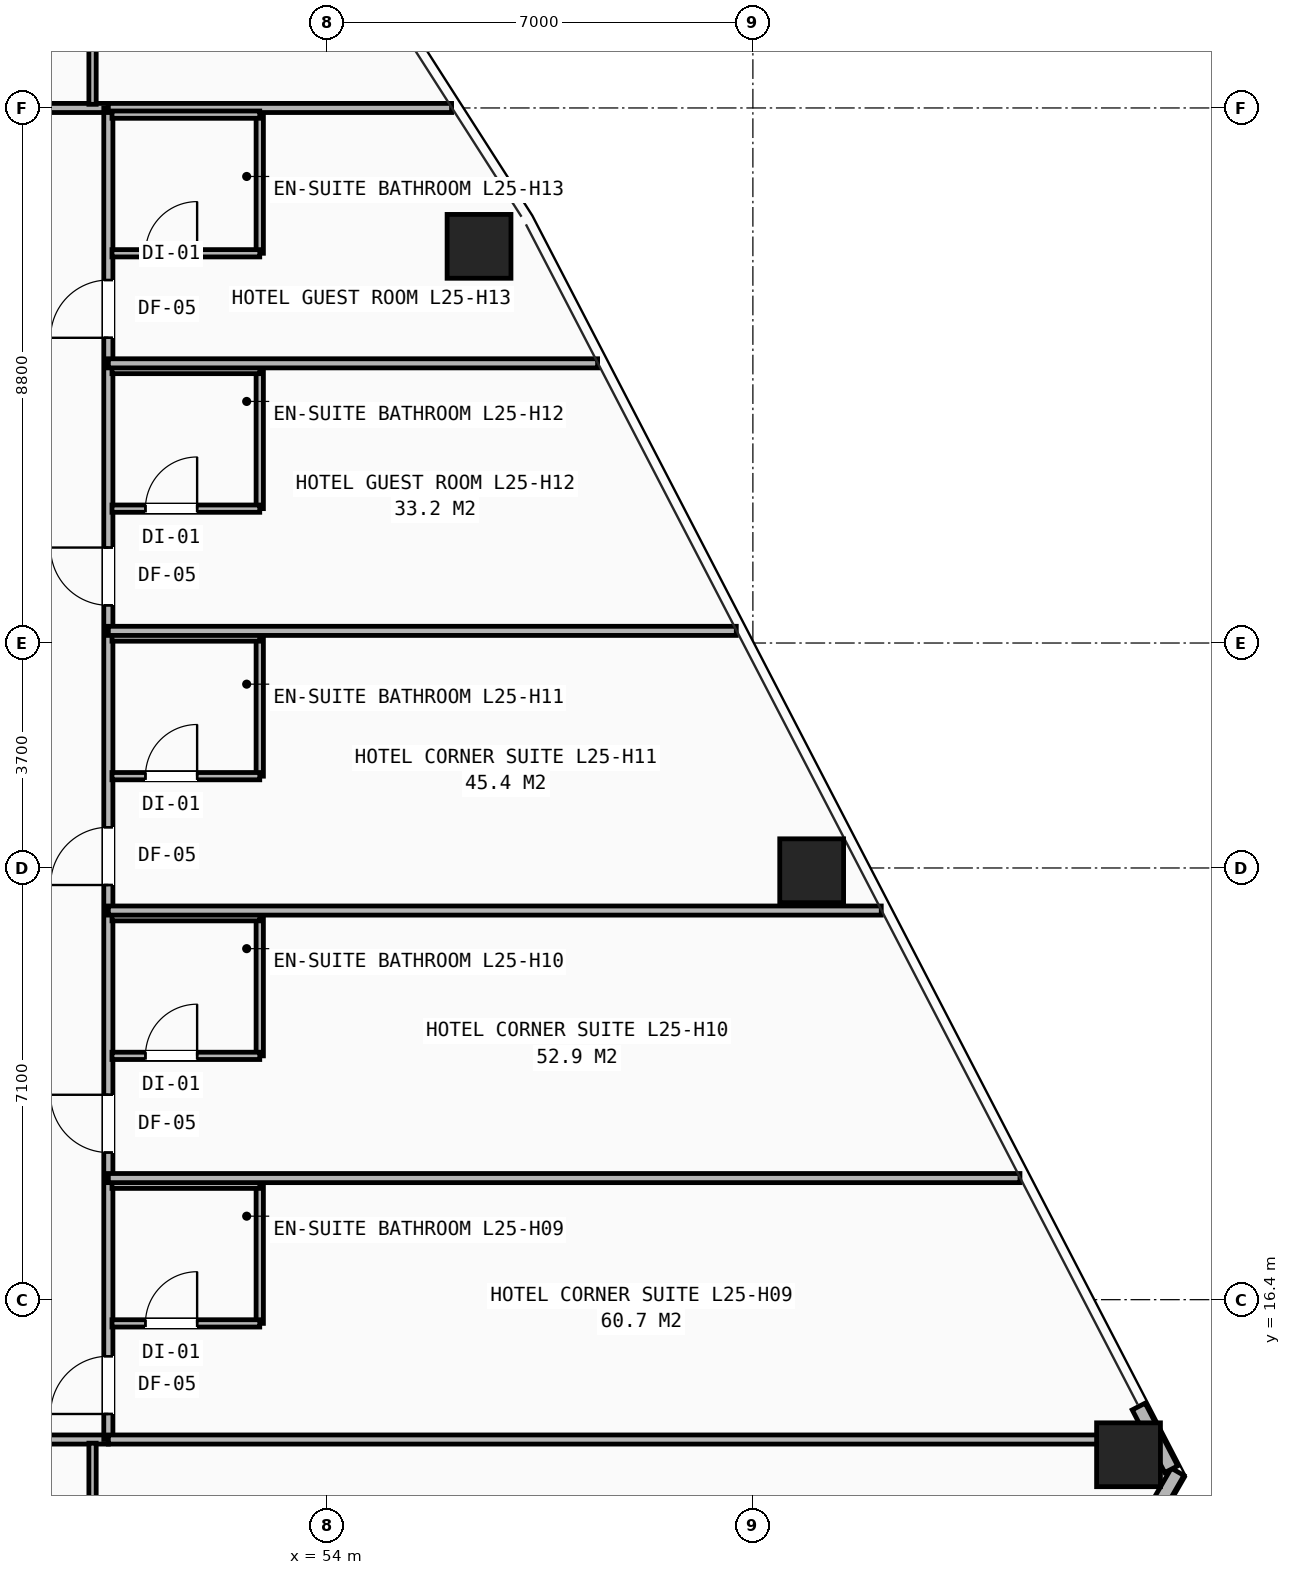
"""IFC4 building model, lengths in metres.
Left out: names, types, materials, properties, quantities, classifications, styles, units other than length and angle.
Written with IfcOpenShell. Run it as: python <this file> out.ifc"""

import sys

from ifc_helpers import new_model, si_unit, direction, frame, frame_2d, origin, origin_2d, place, context, subcontext, project, spatial, rectangle, hollow_rectangle, extrude, element, fill, save


model = new_model("IFC4")
c1 = context("Model", 3, precision=1e-05, world=origin(), true_north=direction((0.0, 1.0)))
c2 = subcontext(c1, "Body", "Model", "MODEL_VIEW")
j1 = project(units=[si_unit("LENGTHUNIT", "METRE"), si_unit("PLANEANGLEUNIT", "RADIAN")], contexts=[c1])
p1 = place(None, origin())
s1 = spatial("IfcSite", under=j1, at=p1, CompositionType="ELEMENT")
p2 = place(p1, origin())
s2 = spatial("IfcBuilding", under=s1, at=p2, CompositionType="ELEMENT")
p3 = place(p2, frame((0.0, 0.0, 89.4)))
s3 = spatial("IfcBuildingStorey", under=s2, at=p3, CompositionType="ELEMENT", Elevation=89.4)
for number, where, z_axis, x_axis in (
    (1, (67.177, 13.849, 0.0), (0.0, 0.0, 1.0), (1.0, 0.0, 0.0)),
    (2, (61.967, 23.455, 0.0), (0.0, 0.0, 1.0), (1.0, 0.0, 0.0)),
    (3, (56.496, 33.724, 0.0), (0.0, 0.0, 1.0), (1.0, 0.0, 0.0)),
):
    element("IfcColumn", number, at=place(p3, frame(where, z_axis=z_axis, x_axis=x_axis)), inside=s3, PredefinedType="COLUMN", context=c2, shape_type="SweptSolid", body=[
        extrude(hollow_rectangle(XDim=1.05, YDim=1.05, WallThickness=0.07, at=origin_2d()), origin(), (0.0, 0.0, 1.0), 3.2),
    ])
p4 = place(p3, frame((67.985, 13.569, 0.0), z_axis=(0.0, 0.0, 1.0), x_axis=(-0.499996243911, -0.866027572353, 0.0)))
e4 = element("IfcWall", 4, at=p4, inside=s3, PredefinedType="SHEAR", context=c2, shape_type="SweptSolid", body=[
    extrude(rectangle(XDim=9.571, YDim=0.24, at=frame_2d((4.786, 0.0))), origin(), (0.0, 0.0, 1.0), 2.253),
])
p5 = place(p3, frame((67.88, 13.611, 0.0), z_axis=(0.0, 0.0, 1.0), x_axis=(-0.460022833548, 0.887907085575, 0.0)))
e5 = element("IfcWall", 5, at=p5, inside=s3, PredefinedType="SHEAR", context=c2, shape_type="SweptSolid", body=[
    extrude(rectangle(XDim=1.162, YDim=0.24, at=frame_2d((0.581, 0.0))), origin(), (0.0, 0.0, 1.0), 2.253),
])
p6 = place(p3, frame((29.6, 14.1, 0.0), z_axis=(0.0, 0.0, 1.0), x_axis=(1.0, 0.0, 0.0)))
e6 = element("IfcWall", 6, at=p6, inside=s3, PredefinedType="PARTITIONING", context=c2, shape_type="SweptSolid", body=[
    extrude(rectangle(XDim=20.8, YDim=0.15, at=frame_2d((10.4, 0.0))), origin(), (0.0, 0.0, 1.0), 2.181),
])
p7 = place(p6, frame((0.57, 0.0, 0.0)))
e7 = element("IfcOpeningElement", 7, at=p7, cuts=e6, PredefinedType="OPENING", context=c2, shape_type="SweptSolid", body=[
    extrude(rectangle(XDim=0.95, YDim=2.1, at=frame_2d((0.475, 1.05))), frame((0.0, 0.085, 0.0), z_axis=(0.0, -1.0, 0.0), x_axis=(1.0, 0.0, 0.0)), (0.0, 0.0, 1.0), 0.17),
])
p8 = place(p6, frame((5.02, 0.0, 0.0)))
e8 = element("IfcOpeningElement", 8, at=p8, cuts=e6, PredefinedType="OPENING", context=c2, shape_type="SweptSolid", body=[
    extrude(rectangle(XDim=0.95, YDim=2.1, at=frame_2d((0.475, 1.05))), frame((0.0, 0.085, 0.0), z_axis=(0.0, -1.0, 0.0), x_axis=(1.0, 0.0, 0.0)), (0.0, 0.0, 1.0), 0.17),
])
p9 = place(p6, frame((10.62, 0.0, 0.0)))
e9 = element("IfcOpeningElement", 9, at=p9, cuts=e6, PredefinedType="OPENING", context=c2, shape_type="SweptSolid", body=[
    extrude(rectangle(XDim=0.95, YDim=2.1, at=frame_2d((0.475, 1.05))), frame((0.0, 0.085, 0.0), z_axis=(0.0, -1.0, 0.0), x_axis=(1.0, 0.0, 0.0)), (0.0, 0.0, 1.0), 0.17),
])
p10 = place(p6, frame((16.42, 0.0, 0.0)))
e10 = element("IfcOpeningElement", 10, at=p10, cuts=e6, PredefinedType="OPENING", context=c2, shape_type="SweptSolid", body=[
    extrude(rectangle(XDim=0.95, YDim=2.1, at=frame_2d((0.475, 1.05))), frame((0.0, 0.085, 0.0), z_axis=(0.0, -1.0, 0.0), x_axis=(1.0, 0.0, 0.0)), (0.0, 0.0, 1.0), 0.17),
])
p11 = place(p3, frame((40.75, 36.0, 0.0), z_axis=(0.0, 0.0, 1.0), x_axis=(1.0, 0.0, 0.0)))
e11 = element("IfcWall", 11, at=p11, inside=s3, PredefinedType="PARTITIONING", context=c2, shape_type="SweptSolid", body=[
    extrude(rectangle(XDim=9.65, YDim=0.15, at=frame_2d((4.825, 0.0))), origin(), (0.0, 0.0, 1.0), 2.503),
])
p12 = place(p11, frame((2.87, 0.0, 0.0)))
e12 = element("IfcOpeningElement", 12, at=p12, cuts=e11, PredefinedType="OPENING", context=c2, shape_type="SweptSolid", body=[
    extrude(rectangle(XDim=0.95, YDim=2.1, at=frame_2d((0.475, 1.05))), frame((0.0, 0.085, 0.0), z_axis=(0.0, -1.0, 0.0), x_axis=(1.0, 0.0, 0.0)), (0.0, 0.0, 1.0), 0.17),
])
p13 = place(p3, frame((50.4, 14.1, 0.0), z_axis=(0.0, 0.0, 1.0), x_axis=(0.0, 1.0, 0.0)))
e13 = element("IfcWall", 13, at=p13, inside=s3, PredefinedType="PARTITIONING", context=c2, shape_type="SweptSolid", body=[
    extrude(rectangle(XDim=21.9, YDim=0.15, at=frame_2d((10.95, 0.0))), origin(), (0.0, 0.0, 1.0), 2.181),
])
p14 = place(p13, frame((0.42, 0.0, 0.0)))
e14 = element("IfcOpeningElement", 14, at=p14, cuts=e13, PredefinedType="OPENING", context=c2, shape_type="SweptSolid", body=[
    extrude(rectangle(XDim=0.95, YDim=2.1, at=frame_2d((0.475, 1.05))), frame((0.0, 0.085, 0.0), z_axis=(0.0, -1.0, 0.0), x_axis=(1.0, 0.0, 0.0)), (0.0, 0.0, 1.0), 0.17),
])
p15 = place(p13, frame((4.72, 0.0, 0.0)))
e15 = element("IfcOpeningElement", 15, at=p15, cuts=e13, PredefinedType="OPENING", context=c2, shape_type="SweptSolid", body=[
    extrude(rectangle(XDim=0.95, YDim=2.1, at=frame_2d((0.475, 1.05))), frame((0.0, 0.085, 0.0), z_axis=(0.0, -1.0, 0.0), x_axis=(1.0, 0.0, 0.0)), (0.0, 0.0, 1.0), 0.17),
])
p16 = place(p13, frame((9.12, 0.0, 0.0)))
e16 = element("IfcOpeningElement", 16, at=p16, cuts=e13, PredefinedType="OPENING", context=c2, shape_type="SweptSolid", body=[
    extrude(rectangle(XDim=0.95, YDim=2.1, at=frame_2d((0.475, 1.05))), frame((0.0, 0.085, 0.0), z_axis=(0.0, -1.0, 0.0), x_axis=(1.0, 0.0, 0.0)), (0.0, 0.0, 1.0), 0.17),
])
p17 = place(p13, frame((13.72, 0.0, 0.0)))
e17 = element("IfcOpeningElement", 17, at=p17, cuts=e13, PredefinedType="OPENING", context=c2, shape_type="SweptSolid", body=[
    extrude(rectangle(XDim=0.95, YDim=2.1, at=frame_2d((0.475, 1.05))), frame((0.0, 0.085, 0.0), z_axis=(0.0, -1.0, 0.0), x_axis=(1.0, 0.0, 0.0)), (0.0, 0.0, 1.0), 0.17),
])
p18 = place(p13, frame((18.12, 0.0, 0.0)))
e18 = element("IfcOpeningElement", 18, at=p18, cuts=e13, PredefinedType="OPENING", context=c2, shape_type="SweptSolid", body=[
    extrude(rectangle(XDim=0.95, YDim=2.1, at=frame_2d((0.475, 1.05))), frame((0.0, 0.085, 0.0), z_axis=(0.0, -1.0, 0.0), x_axis=(1.0, 0.0, 0.0)), (0.0, 0.0, 1.0), 0.17),
])
p19 = place(p3, frame((50.14, 11.61, 0.0), z_axis=(0.0, 0.0, 1.0), x_axis=(0.0, 1.0, 0.0)))
e19 = element("IfcWall", 19, at=p19, inside=s3, PredefinedType="PARTITIONING", context=c2, shape_type="SweptSolid", body=[
    extrude(rectangle(XDim=2.43, YDim=0.12, at=frame_2d((1.215, 0.0))), origin(), (0.0, 0.0, 1.0), 2.97),
])
p20 = place(p3, frame((50.4, 14.1, 0.0), z_axis=(0.0, 0.0, 1.0), x_axis=(1.0, 0.0, 0.0)))
e20 = element("IfcWall", 20, at=p20, inside=s3, PredefinedType="PARTITIONING", context=c2, shape_type="SweptSolid", body=[
    extrude(rectangle(XDim=17.221, YDim=0.15, at=frame_2d((8.61, 0.0))), origin(), (0.0, 0.0, 1.0), 2.181),
])
p21 = place(p3, frame((50.4, 36.0, 0.0), z_axis=(0.0, 0.0, 1.0), x_axis=(1.0, 0.0, 0.0)))
e21 = element("IfcWall", 21, at=p21, inside=s3, PredefinedType="PARTITIONING", context=c2, shape_type="SweptSolid", body=[
    extrude(rectangle(XDim=5.645, YDim=0.15, at=frame_2d((2.823, 0.0))), origin(), (0.0, 0.0, 1.0), 2.258),
])
p22 = place(p3, frame((52.89, 16.01, 0.0), z_axis=(0.0, 0.0, 1.0), x_axis=(0.0, 1.0, 0.0)))
e22 = element("IfcWall", 22, at=p22, inside=s3, PredefinedType="PARTITIONING", context=c2, shape_type="SweptSolid", body=[
    extrude(rectangle(XDim=2.28, YDim=0.12, at=frame_2d((1.14, 0.0))), origin(), (0.0, 0.0, 1.0), 2.97),
])
p23 = place(p3, frame((50.46, 16.01, 0.0), z_axis=(0.0, 0.0, 1.0), x_axis=(1.0, 0.0, 0.0)))
e23 = element("IfcWall", 23, at=p23, inside=s3, PredefinedType="PARTITIONING", context=c2, shape_type="SweptSolid", body=[
    extrude(rectangle(XDim=2.43, YDim=0.12, at=frame_2d((1.215, 0.0))), origin(), (0.0, 0.0, 1.0), 2.97),
])
p24 = place(p23, frame((0.55, 0.0, 0.0)))
e24 = element("IfcOpeningElement", 24, at=p24, cuts=e23, PredefinedType="OPENING", context=c2, shape_type="SweptSolid", body=[
    extrude(rectangle(XDim=0.85, YDim=2.05, at=frame_2d((0.425, 1.025))), frame((0.0, 0.07, 0.0), z_axis=(0.0, -1.0, 0.0), x_axis=(1.0, 0.0, 0.0)), (0.0, 0.0, 1.0), 0.14),
])
p25 = place(p3, frame((50.46, 18.29, 0.0), z_axis=(0.0, 0.0, 1.0), x_axis=(1.0, 0.0, 0.0)))
e25 = element("IfcWall", 25, at=p25, inside=s3, PredefinedType="PARTITIONING", context=c2, shape_type="SweptSolid", body=[
    extrude(rectangle(XDim=2.43, YDim=0.12, at=frame_2d((1.215, 0.0))), origin(), (0.0, 0.0, 1.0), 2.97),
])
p26 = place(p3, frame((50.4, 18.4, 0.0), z_axis=(0.0, 0.0, 1.0), x_axis=(1.0, 0.0, 0.0)))
e26 = element("IfcWall", 26, at=p26, inside=s3, PredefinedType="PARTITIONING", context=c2, shape_type="SweptSolid", body=[
    extrude(rectangle(XDim=14.992, YDim=0.15, at=frame_2d((7.496, 0.0))), origin(), (0.0, 0.0, 1.0), 2.258),
])
p27 = place(p3, frame((52.89, 20.41, 0.0), z_axis=(0.0, 0.0, 1.0), x_axis=(0.0, 1.0, 0.0)))
e27 = element("IfcWall", 27, at=p27, inside=s3, PredefinedType="PARTITIONING", context=c2, shape_type="SweptSolid", body=[
    extrude(rectangle(XDim=2.28, YDim=0.12, at=frame_2d((1.14, 0.0))), origin(), (0.0, 0.0, 1.0), 2.97),
])
p28 = place(p3, frame((50.46, 20.41, 0.0), z_axis=(0.0, 0.0, 1.0), x_axis=(1.0, 0.0, 0.0)))
e28 = element("IfcWall", 28, at=p28, inside=s3, PredefinedType="PARTITIONING", context=c2, shape_type="SweptSolid", body=[
    extrude(rectangle(XDim=2.43, YDim=0.12, at=frame_2d((1.215, 0.0))), origin(), (0.0, 0.0, 1.0), 2.97),
])
p29 = place(p28, frame((0.55, 0.0, 0.0)))
e29 = element("IfcOpeningElement", 29, at=p29, cuts=e28, PredefinedType="OPENING", context=c2, shape_type="SweptSolid", body=[
    extrude(rectangle(XDim=0.85, YDim=2.05, at=frame_2d((0.425, 1.025))), frame((0.0, 0.07, 0.0), z_axis=(0.0, -1.0, 0.0), x_axis=(1.0, 0.0, 0.0)), (0.0, 0.0, 1.0), 0.14),
])
p30 = place(p3, frame((50.46, 22.69, 0.0), z_axis=(0.0, 0.0, 1.0), x_axis=(1.0, 0.0, 0.0)))
e30 = element("IfcWall", 30, at=p30, inside=s3, PredefinedType="PARTITIONING", context=c2, shape_type="SweptSolid", body=[
    extrude(rectangle(XDim=2.43, YDim=0.12, at=frame_2d((1.215, 0.0))), origin(), (0.0, 0.0, 1.0), 2.97),
])
p31 = place(p3, frame((50.4, 22.8, 0.0), z_axis=(0.0, 0.0, 1.0), x_axis=(1.0, 0.0, 0.0)))
e31 = element("IfcWall", 31, at=p31, inside=s3, PredefinedType="PARTITIONING", context=c2, shape_type="SweptSolid", body=[
    extrude(rectangle(XDim=12.711, YDim=0.15, at=frame_2d((6.356, 0.0))), origin(), (0.0, 0.0, 1.0), 2.258),
])
p32 = place(p3, frame((52.89, 25.01, 0.0), z_axis=(0.0, 0.0, 1.0), x_axis=(0.0, 1.0, 0.0)))
e32 = element("IfcWall", 32, at=p32, inside=s3, PredefinedType="PARTITIONING", context=c2, shape_type="SweptSolid", body=[
    extrude(rectangle(XDim=2.28, YDim=0.12, at=frame_2d((1.14, 0.0))), origin(), (0.0, 0.0, 1.0), 2.97),
])
p33 = place(p3, frame((50.46, 25.01, 0.0), z_axis=(0.0, 0.0, 1.0), x_axis=(1.0, 0.0, 0.0)))
e33 = element("IfcWall", 33, at=p33, inside=s3, PredefinedType="PARTITIONING", context=c2, shape_type="SweptSolid", body=[
    extrude(rectangle(XDim=2.43, YDim=0.12, at=frame_2d((1.215, 0.0))), origin(), (0.0, 0.0, 1.0), 2.97),
])
p34 = place(p33, frame((0.55, 0.0, 0.0)))
e34 = element("IfcOpeningElement", 34, at=p34, cuts=e33, PredefinedType="OPENING", context=c2, shape_type="SweptSolid", body=[
    extrude(rectangle(XDim=0.85, YDim=2.05, at=frame_2d((0.425, 1.025))), frame((0.0, 0.07, 0.0), z_axis=(0.0, -1.0, 0.0), x_axis=(1.0, 0.0, 0.0)), (0.0, 0.0, 1.0), 0.14),
])
p35 = place(p3, frame((50.46, 27.29, 0.0), z_axis=(0.0, 0.0, 1.0), x_axis=(1.0, 0.0, 0.0)))
e35 = element("IfcWall", 35, at=p35, inside=s3, PredefinedType="PARTITIONING", context=c2, shape_type="SweptSolid", body=[
    extrude(rectangle(XDim=2.43, YDim=0.12, at=frame_2d((1.215, 0.0))), origin(), (0.0, 0.0, 1.0), 2.97),
])
p36 = place(p3, frame((50.4, 27.4, 0.0), z_axis=(0.0, 0.0, 1.0), x_axis=(1.0, 0.0, 0.0)))
e36 = element("IfcWall", 36, at=p36, inside=s3, PredefinedType="PARTITIONING", context=c2, shape_type="SweptSolid", body=[
    extrude(rectangle(XDim=10.327, YDim=0.15, at=frame_2d((5.164, 0.0))), origin(), (0.0, 0.0, 1.0), 2.258),
])
p37 = place(p3, frame((52.89, 29.41, 0.0), z_axis=(0.0, 0.0, 1.0), x_axis=(0.0, 1.0, 0.0)))
e37 = element("IfcWall", 37, at=p37, inside=s3, PredefinedType="PARTITIONING", context=c2, shape_type="SweptSolid", body=[
    extrude(rectangle(XDim=2.28, YDim=0.12, at=frame_2d((1.14, 0.0))), origin(), (0.0, 0.0, 1.0), 2.97),
])
p38 = place(p3, frame((50.46, 29.41, 0.0), z_axis=(0.0, 0.0, 1.0), x_axis=(1.0, 0.0, 0.0)))
e38 = element("IfcWall", 38, at=p38, inside=s3, PredefinedType="PARTITIONING", context=c2, shape_type="SweptSolid", body=[
    extrude(rectangle(XDim=2.43, YDim=0.12, at=frame_2d((1.215, 0.0))), origin(), (0.0, 0.0, 1.0), 2.97),
])
p39 = place(p38, frame((0.55, 0.0, 0.0)))
e39 = element("IfcOpeningElement", 39, at=p39, cuts=e38, PredefinedType="OPENING", context=c2, shape_type="SweptSolid", body=[
    extrude(rectangle(XDim=0.85, YDim=2.05, at=frame_2d((0.425, 1.025))), frame((0.0, 0.07, 0.0), z_axis=(0.0, -1.0, 0.0), x_axis=(1.0, 0.0, 0.0)), (0.0, 0.0, 1.0), 0.14),
])
p40 = place(p3, frame((50.46, 31.69, 0.0), z_axis=(0.0, 0.0, 1.0), x_axis=(1.0, 0.0, 0.0)))
e40 = element("IfcWall", 40, at=p40, inside=s3, PredefinedType="PARTITIONING", context=c2, shape_type="SweptSolid", body=[
    extrude(rectangle(XDim=2.43, YDim=0.12, at=frame_2d((1.215, 0.0))), origin(), (0.0, 0.0, 1.0), 2.181),
])
p41 = place(p3, frame((50.4, 31.8, 0.0), z_axis=(0.0, 0.0, 1.0), x_axis=(1.0, 0.0, 0.0)))
e41 = element("IfcWall", 41, at=p41, inside=s3, PredefinedType="PARTITIONING", context=c2, shape_type="SweptSolid", body=[
    extrude(rectangle(XDim=8.046, YDim=0.15, at=frame_2d((4.023, 0.0))), origin(), (0.0, 0.0, 1.0), 2.181),
])
p42 = place(p3, frame((52.89, 33.61, 0.0), z_axis=(0.0, 0.0, 1.0), x_axis=(0.0, 1.0, 0.0)))
e42 = element("IfcWall", 42, at=p42, inside=s3, PredefinedType="PARTITIONING", context=c2, shape_type="SweptSolid", body=[
    extrude(rectangle(XDim=2.28, YDim=0.12, at=frame_2d((1.14, 0.0))), origin(), (0.0, 0.0, 1.0), 2.97),
])
p43 = place(p3, frame((50.46, 33.61, 0.0), z_axis=(0.0, 0.0, 1.0), x_axis=(1.0, 0.0, 0.0)))
e43 = element("IfcWall", 43, at=p43, inside=s3, PredefinedType="PARTITIONING", context=c2, shape_type="SweptSolid", body=[
    extrude(rectangle(XDim=2.43, YDim=0.12, at=frame_2d((1.215, 0.0))), origin(), (0.0, 0.0, 1.0), 2.503),
])
p44 = place(p43, frame((0.55, 0.0, 0.0)))
e44 = element("IfcOpeningElement", 44, at=p44, cuts=e43, PredefinedType="OPENING", context=c2, shape_type="SweptSolid", body=[
    extrude(rectangle(XDim=0.85, YDim=2.05, at=frame_2d((0.425, 1.025))), frame((0.0, 0.07, 0.0), z_axis=(0.0, -1.0, 0.0), x_axis=(1.0, 0.0, 0.0)), (0.0, 0.0, 1.0), 0.14),
])
for number, where, z_axis, x_axis in (
    (45, (50.46, 35.89, 0.0), (0.0, 0.0, 1.0), (1.0, 0.0, 0.0)),
    (46, (50.14, 36.06, 0.0), (0.0, 0.0, 1.0), (0.0, 1.0, 0.0)),
):
    element("IfcWall", number, at=place(p3, frame(where, z_axis=z_axis, x_axis=x_axis)), inside=s3, PredefinedType="PARTITIONING", context=c2, shape_type="SweptSolid", body=[
        extrude(rectangle(XDim=2.43, YDim=0.12, at=frame_2d((1.215, 0.0))), origin(), (0.0, 0.0, 1.0), 2.97),
    ])
p45 = place(p14, origin())
e47 = element("IfcDoor", 47, at=p45, inside=s3, OperationType="SINGLE_SWING_LEFT", PredefinedType="DOOR", context=c2, shape_type="SweptSolid", body=[
    extrude(rectangle(XDim=0.95, YDim=2.1, at=frame_2d((0.475, 1.05))), frame((0.0, 0.025, 0.0), z_axis=(0.0, -1.0, 0.0), x_axis=(1.0, 0.0, 0.0)), (0.0, 0.0, 1.0), 0.05),
])
fill(e14, e47)
p46 = place(p24, origin())
e48 = element("IfcDoor", 48, at=p46, inside=s3, OperationType="SINGLE_SWING_RIGHT", PredefinedType="DOOR", context=c2, shape_type="SweptSolid", body=[
    extrude(rectangle(XDim=0.85, YDim=2.05, at=frame_2d((0.425, 1.025))), frame((0.0, 0.025, 0.0), z_axis=(0.0, -1.0, 0.0), x_axis=(1.0, 0.0, 0.0)), (0.0, 0.0, 1.0), 0.05),
])
fill(e24, e48)
p47 = place(p15, origin())
e49 = element("IfcDoor", 49, at=p47, inside=s3, OperationType="SINGLE_SWING_RIGHT", PredefinedType="DOOR", context=c2, shape_type="SweptSolid", body=[
    extrude(rectangle(XDim=0.95, YDim=2.1, at=frame_2d((0.475, 1.05))), frame((0.0, 0.025, 0.0), z_axis=(0.0, -1.0, 0.0), x_axis=(1.0, 0.0, 0.0)), (0.0, 0.0, 1.0), 0.05),
])
fill(e15, e49)
p48 = place(p29, origin())
e50 = element("IfcDoor", 50, at=p48, inside=s3, OperationType="SINGLE_SWING_RIGHT", PredefinedType="DOOR", context=c2, shape_type="SweptSolid", body=[
    extrude(rectangle(XDim=0.85, YDim=2.05, at=frame_2d((0.425, 1.025))), frame((0.0, 0.025, 0.0), z_axis=(0.0, -1.0, 0.0), x_axis=(1.0, 0.0, 0.0)), (0.0, 0.0, 1.0), 0.05),
])
fill(e29, e50)
p49 = place(p16, origin())
e51 = element("IfcDoor", 51, at=p49, inside=s3, OperationType="SINGLE_SWING_LEFT", PredefinedType="DOOR", context=c2, shape_type="SweptSolid", body=[
    extrude(rectangle(XDim=0.95, YDim=2.1, at=frame_2d((0.475, 1.05))), frame((0.0, 0.025, 0.0), z_axis=(0.0, -1.0, 0.0), x_axis=(1.0, 0.0, 0.0)), (0.0, 0.0, 1.0), 0.05),
])
fill(e16, e51)
p50 = place(p34, origin())
e52 = element("IfcDoor", 52, at=p50, inside=s3, OperationType="SINGLE_SWING_RIGHT", PredefinedType="DOOR", context=c2, shape_type="SweptSolid", body=[
    extrude(rectangle(XDim=0.85, YDim=2.05, at=frame_2d((0.425, 1.025))), frame((0.0, 0.025, 0.0), z_axis=(0.0, -1.0, 0.0), x_axis=(1.0, 0.0, 0.0)), (0.0, 0.0, 1.0), 0.05),
])
fill(e34, e52)
p51 = place(p17, origin())
e53 = element("IfcDoor", 53, at=p51, inside=s3, OperationType="SINGLE_SWING_RIGHT", PredefinedType="DOOR", context=c2, shape_type="SweptSolid", body=[
    extrude(rectangle(XDim=0.95, YDim=2.1, at=frame_2d((0.475, 1.05))), frame((0.0, 0.025, 0.0), z_axis=(0.0, -1.0, 0.0), x_axis=(1.0, 0.0, 0.0)), (0.0, 0.0, 1.0), 0.05),
])
fill(e17, e53)
p52 = place(p39, origin())
e54 = element("IfcDoor", 54, at=p52, inside=s3, OperationType="SINGLE_SWING_RIGHT", PredefinedType="DOOR", context=c2, shape_type="SweptSolid", body=[
    extrude(rectangle(XDim=0.85, YDim=2.05, at=frame_2d((0.425, 1.025))), frame((0.0, 0.025, 0.0), z_axis=(0.0, -1.0, 0.0), x_axis=(1.0, 0.0, 0.0)), (0.0, 0.0, 1.0), 0.05),
])
fill(e39, e54)
p53 = place(p18, origin())
e55 = element("IfcDoor", 55, at=p53, inside=s3, OperationType="SINGLE_SWING_LEFT", PredefinedType="DOOR", context=c2, shape_type="SweptSolid", body=[
    extrude(rectangle(XDim=0.95, YDim=2.1, at=frame_2d((0.475, 1.05))), frame((0.0, 0.025, 0.0), z_axis=(0.0, -1.0, 0.0), x_axis=(1.0, 0.0, 0.0)), (0.0, 0.0, 1.0), 0.05),
])
fill(e18, e55)
p54 = place(p44, origin())
e56 = element("IfcDoor", 56, at=p54, inside=s3, OperationType="SINGLE_SWING_RIGHT", PredefinedType="DOOR", context=c2, shape_type="SweptSolid", body=[
    extrude(rectangle(XDim=0.85, YDim=2.05, at=frame_2d((0.425, 1.025))), frame((0.0, 0.025, 0.0), z_axis=(0.0, -1.0, 0.0), x_axis=(1.0, 0.0, 0.0)), (0.0, 0.0, 1.0), 0.05),
])
fill(e44, e56)
save(model, sys.argv[1])
